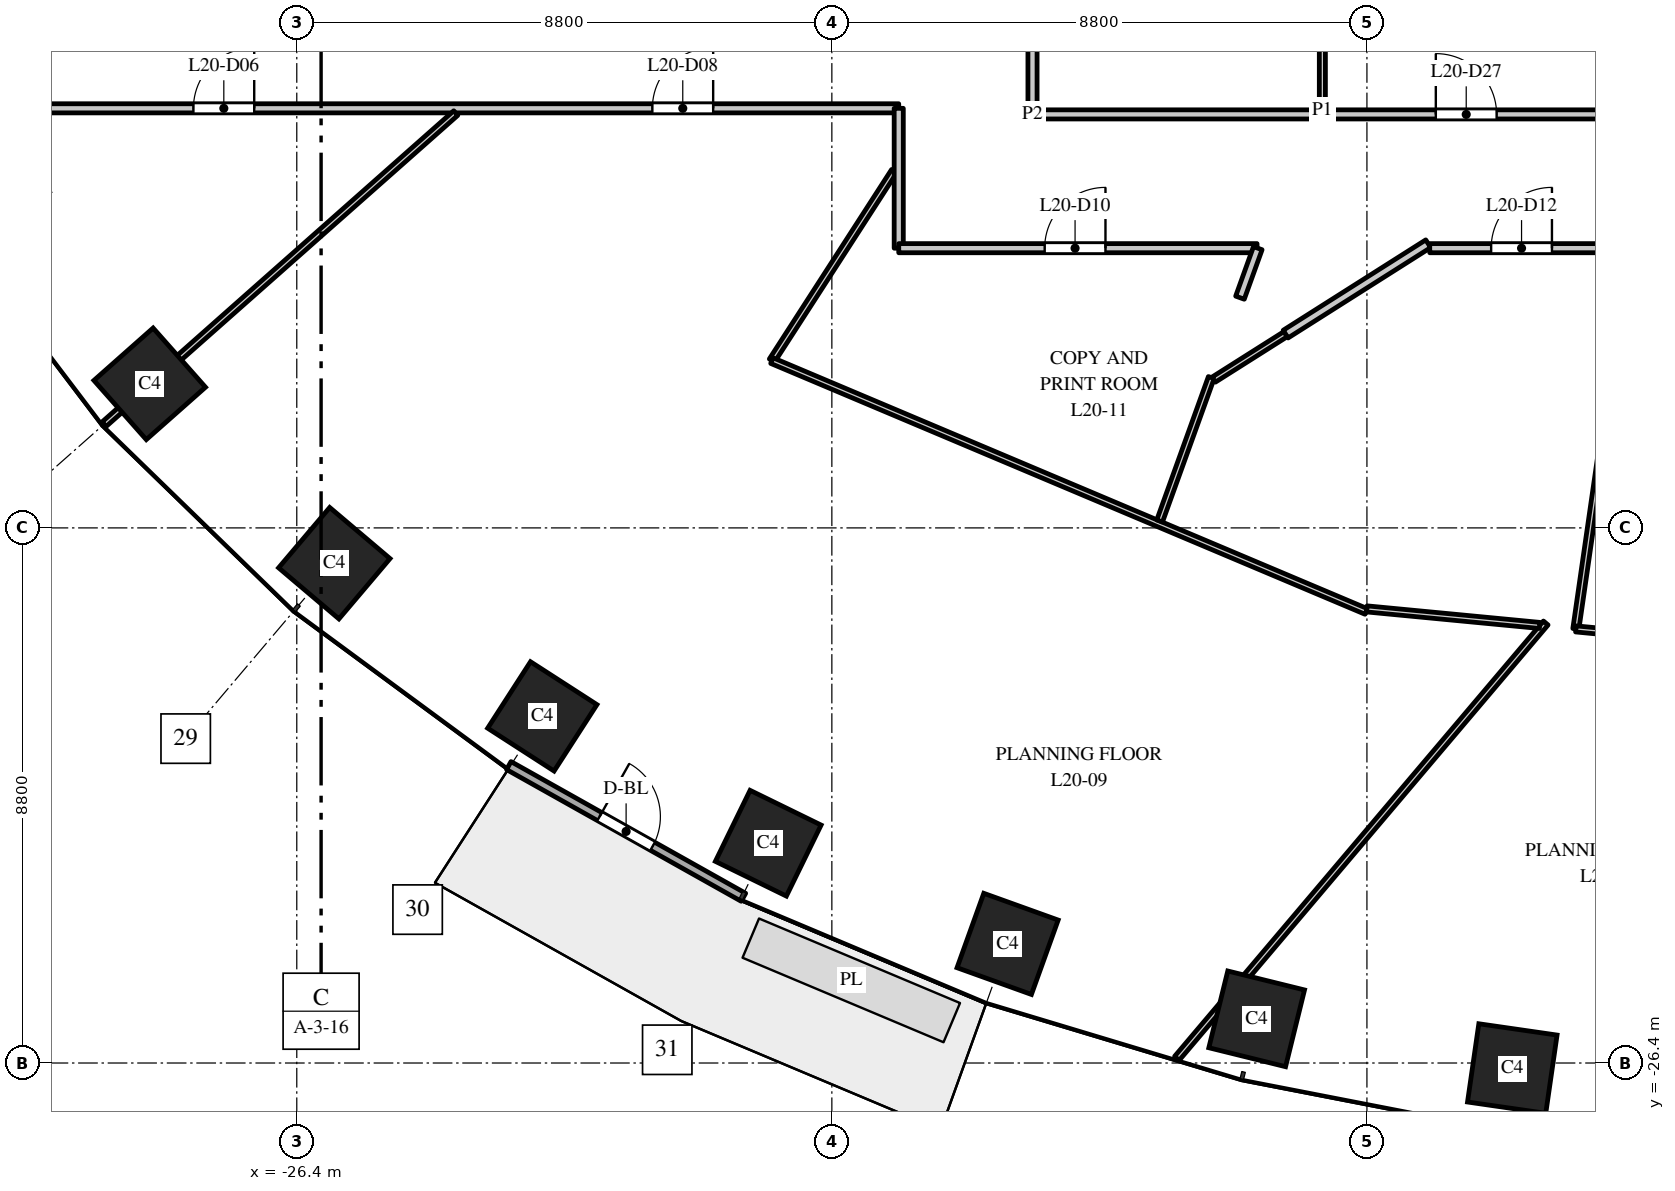
"""IFC4 building model, lengths in metres.
Left out: names, types, materials, properties, quantities, classifications, styles, units other than length and angle.
Written with IfcOpenShell. Run it as: python <this file> out.ifc"""

import sys

from ifc_helpers import new_model, si_unit, direction, frame, frame_2d, origin, origin_2d, place, context, subcontext, project, spatial, rectangle, extrude, element, fill, save


model = new_model("IFC4")
c1 = context("Model", 3, precision=1e-05, world=origin(), true_north=direction((0.0, 1.0)))
c2 = subcontext(c1, "Body", "Model", "MODEL_VIEW")
j1 = project(units=[si_unit("LENGTHUNIT", "METRE"), si_unit("PLANEANGLEUNIT", "RADIAN")], contexts=[c1])
p1 = place(None, origin())
s1 = spatial("IfcSite", under=j1, at=p1, CompositionType="ELEMENT")
p2 = place(p1, origin())
s2 = spatial("IfcBuilding", under=s1, at=p2, CompositionType="ELEMENT")
p3 = place(p2, frame((0.0, 0.0, 92.0)))
s3 = spatial("IfcBuildingStorey", under=s2, at=p3, CompositionType="ELEMENT", Elevation=92.0)
for number, where, z_axis, x_axis in (
    (1, (-28.819, -15.23, 0.0), (0.0, 0.0, 1.0), (0.663, -0.749, 0.0)),
    (2, (-25.783, -18.18, 0.0), (0.0, 0.0, 1.0), (0.763, -0.646, 0.0)),
    (3, (-22.362, -20.7, 0.0), (0.0, 0.0, 1.0), (0.84, -0.542, 0.0)),
    (4, (-18.646, -22.785, 0.0), (0.0, 0.0, 1.0), (0.898, -0.439, 0.0)),
    (5, (-14.709, -24.441, 0.0), (0.0, 0.0, 1.0), (0.941, -0.338, 0.0)),
    (6, (-10.613, -25.674, 0.0), (0.0, 0.0, 1.0), (0.971, -0.24, 0.0)),
    (7, (-6.409, -26.491, 0.0), (0.0, 0.0, 1.0), (0.99, -0.143, 0.0)),
):
    element("IfcColumn", number, at=place(p3, frame(where, z_axis=z_axis, x_axis=x_axis)), inside=s3, PredefinedType="COLUMN", context=c2, shape_type="SweptSolid", body=[
        extrude(rectangle(XDim=1.3, YDim=1.3, at=origin_2d()), origin(), (0.0, 0.0, 1.0), 4.0),
    ])
p4 = place(p3, frame((-22.913, -21.509, 0.0), z_axis=(0.0, 0.0, 1.0), x_axis=(0.872046572975, -0.489422899509, 0.0)))
e8 = element("IfcWall", 8, at=p4, inside=s3, PredefinedType="STANDARD", context=c2, shape_type="SweptSolid", body=[
    extrude(rectangle(XDim=4.426, YDim=0.15, at=frame_2d((2.213, 0.0))), origin(), (0.0, 0.0, 1.0), 3.7),
])
p5 = place(p4, frame((1.713, 0.0, 0.0)))
e9 = element("IfcOpeningElement", 9, at=p5, cuts=e8, PredefinedType="OPENING", context=c2, shape_type="SweptSolid", body=[
    extrude(rectangle(XDim=1.0, YDim=2.4, at=frame_2d((0.5, 1.2))), frame((0.0, 0.085, 0.0), z_axis=(0.0, -1.0, 0.0), x_axis=(1.0, 0.0, 0.0)), (0.0, 0.0, 1.0), 0.17),
])
p6 = place(p3, frame((-31.5, -10.7, 0.0), z_axis=(0.0, 0.0, 1.0), x_axis=(1.0, 0.0, 0.0)))
e10 = element("IfcWall", 10, at=p6, inside=s3, PredefinedType="PARTITIONING", context=c2, shape_type="SweptSolid", body=[
    extrude(rectangle(XDim=15.0, YDim=0.15, at=frame_2d((7.5, 0.0))), origin(), (0.0, 0.0, 1.0), 3.1),
])
p7 = place(p6, frame((3.4, 0.0, 0.0)))
e11 = element("IfcOpeningElement", 11, at=p7, cuts=e10, PredefinedType="OPENING", context=c2, shape_type="SweptSolid", body=[
    extrude(rectangle(XDim=1.0, YDim=2.1, at=frame_2d((0.5, 1.05))), frame((0.0, 0.085, 0.0), z_axis=(0.0, -1.0, 0.0), x_axis=(1.0, 0.0, 0.0)), (0.0, 0.0, 1.0), 0.17),
])
p8 = place(p6, frame((10.948, 0.0, 0.0)))
e12 = element("IfcOpeningElement", 12, at=p8, cuts=e10, PredefinedType="OPENING", context=c2, shape_type="SweptSolid", body=[
    extrude(rectangle(XDim=1.0, YDim=2.1, at=frame_2d((0.5, 1.05))), frame((0.0, 0.085, 0.0), z_axis=(0.0, -1.0, 0.0), x_axis=(1.0, 0.0, 0.0)), (0.0, 0.0, 1.0), 0.17),
])
p9 = place(p3, frame((-29.569, -15.895, 0.0), z_axis=(0.0, 0.0, 1.0), x_axis=(0.748985701008, 0.662586160198, 0.0)))
e13 = element("IfcWall", 13, at=p9, inside=s3, PredefinedType="PARTITIONING", context=c2, shape_type="SweptSolid", body=[
    extrude(rectangle(XDim=7.723, YDim=0.1, at=frame_2d((3.861, 0.0))), origin(), (0.0, 0.0, 1.0), 2.9),
])
p10 = place(p3, frame((-18.586, -14.849, 0.0), z_axis=(0.0, 0.0, 1.0), x_axis=(0.542227325377, 0.840231829684, 0.0)))
e14 = element("IfcWall", 14, at=p10, inside=s3, PredefinedType="PARTITIONING", context=c2, shape_type="SweptSolid", body=[
    extrude(rectangle(XDim=3.709, YDim=0.1, at=frame_2d((1.854, 0.0))), origin(), (0.0, 0.0, 1.0), 2.75),
])
p11 = place(p3, frame((-18.586, -14.849, 0.0), z_axis=(0.0, 0.0, 1.0), x_axis=(0.921309292198, -0.388830539066, 0.0)))
e15 = element("IfcWall", 15, at=p11, inside=s3, PredefinedType="PARTITIONING", context=c2, shape_type="SweptSolid", body=[
    extrude(rectangle(XDim=10.609, YDim=0.1, at=frame_2d((5.304, 0.0))), origin(), (0.0, 0.0, 1.0), 2.85),
])
p12 = place(p3, frame((-16.5, -13.0, 0.0), z_axis=(0.0, 0.0, 1.0), x_axis=(0.0, 1.0, 0.0)))
e16 = element("IfcWall", 16, at=p12, inside=s3, PredefinedType="PARTITIONING", context=c2, shape_type="SweptSolid", body=[
    extrude(rectangle(XDim=2.3, YDim=0.15, at=frame_2d((1.15, 0.0))), origin(), (0.0, 0.0, 1.0), 2.75),
])
p13 = place(p3, frame((-16.5, -13.0, 0.0), z_axis=(0.0, 0.0, 1.0), x_axis=(1.0, 0.0, 0.0)))
e17 = element("IfcWall", 17, at=p13, inside=s3, PredefinedType="PARTITIONING", context=c2, shape_type="SweptSolid", body=[
    extrude(rectangle(XDim=5.893, YDim=0.15, at=frame_2d((2.947, 0.0))), origin(), (0.0, 0.0, 1.0), 2.85),
])
p14 = place(p13, frame((2.4, 0.0, 0.0)))
e18 = element("IfcOpeningElement", 18, at=p14, cuts=e17, PredefinedType="OPENING", context=c2, shape_type="SweptSolid", body=[
    extrude(rectangle(XDim=1.0, YDim=2.1, at=frame_2d((0.5, 1.05))), frame((0.0, 0.085, 0.0), z_axis=(0.0, -1.0, 0.0), x_axis=(1.0, 0.0, 0.0)), (0.0, 0.0, 1.0), 0.17),
])
p15 = place(p3, frame((-14.3, -10.8, 0.0), z_axis=(0.0, 0.0, 1.0), x_axis=(0.0, 1.0, 0.0)))
e19 = element("IfcWall", 19, at=p15, inside=s3, PredefinedType="PARTITIONING", context=c2, shape_type="SweptSolid", body=[
    extrude(rectangle(XDim=21.6, YDim=0.15, at=frame_2d((10.8, 0.0))), origin(), (0.0, 0.0, 1.0), 2.75),
])
p16 = place(p15, frame((10.4, 0.0, 0.0)))
e20 = element("IfcOpeningElement", 20, at=p16, cuts=e19, PredefinedType="OPENING", context=c2, shape_type="SweptSolid", body=[
    extrude(rectangle(XDim=1.0, YDim=2.1, at=frame_2d((0.5, 1.05))), frame((0.0, 0.085, 0.0), z_axis=(0.0, -1.0, 0.0), x_axis=(1.0, 0.0, 0.0)), (0.0, 0.0, 1.0), 0.17),
])
p17 = place(p3, frame((-14.3, -10.8, 0.0), z_axis=(0.0, 0.0, 1.0), x_axis=(1.0, 0.0, 0.0)))
e21 = element("IfcWall", 21, at=p17, inside=s3, PredefinedType="PARTITIONING", context=c2, shape_type="SweptSolid", body=[
    extrude(rectangle(XDim=28.6, YDim=0.15, at=frame_2d((14.3, 0.0))), origin(), (0.0, 0.0, 1.0), 2.85),
])
p18 = place(p17, frame((6.633, 0.0, 0.0)))
e22 = element("IfcOpeningElement", 22, at=p18, cuts=e21, PredefinedType="OPENING", context=c2, shape_type="SweptSolid", body=[
    extrude(rectangle(XDim=1.0, YDim=2.1, at=frame_2d((0.5, 1.05))), frame((0.0, 0.085, 0.0), z_axis=(0.0, -1.0, 0.0), x_axis=(1.0, 0.0, 0.0)), (0.0, 0.0, 1.0), 0.17),
])
p19 = place(p17, frame((11.4, 0.0, 0.0)))
e23 = element("IfcOpeningElement", 23, at=p19, cuts=e21, PredefinedType="OPENING", context=c2, shape_type="SweptSolid", body=[
    extrude(rectangle(XDim=1.0, YDim=2.1, at=frame_2d((0.5, 1.05))), frame((0.0, 0.085, 0.0), z_axis=(0.0, -1.0, 0.0), x_axis=(1.0, 0.0, 0.0)), (0.0, 0.0, 1.0), 0.17),
])
p20 = place(p17, frame((16.167, 0.0, 0.0)))
e24 = element("IfcOpeningElement", 24, at=p20, cuts=e21, PredefinedType="OPENING", context=c2, shape_type="SweptSolid", body=[
    extrude(rectangle(XDim=1.0, YDim=2.1, at=frame_2d((0.5, 1.05))), frame((0.0, 0.085, 0.0), z_axis=(0.0, -1.0, 0.0), x_axis=(1.0, 0.0, 0.0)), (0.0, 0.0, 1.0), 0.17),
])
p21 = place(p3, frame((-12.209, -17.486, 0.0), z_axis=(0.0, 0.0, 1.0), x_axis=(0.338698771758, 0.940894862357, 0.0)))
e25 = element("IfcWall", 25, at=p21, inside=s3, PredefinedType="PARTITIONING", context=c2, shape_type="SweptSolid", body=[
    extrude(rectangle(XDim=2.506, YDim=0.1, at=frame_2d((1.253, 0.0))), origin(), (0.0, 0.0, 1.0), 3.7),
])
p22 = place(p3, frame((-11.925, -26.323, 0.0), z_axis=(0.0, 0.0, 1.0), x_axis=(0.646476265577, 0.762934098101, 0.0)))
e26 = element("IfcWall", 26, at=p22, inside=s3, PredefinedType="PARTITIONING", context=c2, shape_type="SweptSolid", body=[
    extrude(rectangle(XDim=9.384, YDim=0.1, at=frame_2d((4.692, 0.0))), origin(), (0.0, 0.0, 1.0), 2.85),
])
p23 = place(p3, frame((-11.319, -15.161, 0.0), z_axis=(0.0, 0.0, 1.0), x_axis=(0.845102975348, 0.534603555037, 0.0)))
e27 = element("IfcWall", 27, at=p23, inside=s3, PredefinedType="PARTITIONING", context=c2, shape_type="SweptSolid", body=[
    extrude(rectangle(XDim=1.399, YDim=0.1, at=frame_2d((0.699, 0.0))), origin(), (0.0, 0.0, 1.0), 3.7),
])
p24 = place(p3, frame((-10.888, -13.814, 0.0), z_axis=(0.0, 0.0, 1.0), x_axis=(0.338659506624, 0.940908995904, 0.0)))
e28 = element("IfcWall", 28, at=p24, inside=s3, PredefinedType="PARTITIONING", context=c2, shape_type="SweptSolid", body=[
    extrude(rectangle(XDim=0.865, YDim=0.15, at=frame_2d((0.433, 0.0))), origin(), (0.0, 0.0, 1.0), 2.85),
])
p25 = place(p3, frame((-10.137, -14.413, 0.0), z_axis=(0.0, 0.0, 1.0), x_axis=(0.844666662568, 0.535292657475, 0.0)))
e29 = element("IfcWall", 29, at=p25, inside=s3, PredefinedType="PARTITIONING", context=c2, shape_type="SweptSolid", body=[
    extrude(rectangle(XDim=2.776, YDim=0.15, at=frame_2d((1.388, 0.0))), origin(), (0.0, 0.0, 1.0), 3.7),
])
p26 = place(p3, frame((-9.533, -10.725, 0.0), z_axis=(0.0, 0.0, 1.0), x_axis=(0.0, 1.0, 0.0)))
e30 = element("IfcWall", 30, at=p26, inside=s3, PredefinedType="PARTITIONING", context=c2, shape_type="SweptSolid", body=[
    extrude(rectangle(XDim=21.45, YDim=0.1, at=frame_2d((10.725, 0.0))), origin(), (0.0, 0.0, 1.0), 2.75),
])
p27 = place(p3, frame((-8.802, -18.932, 0.0), z_axis=(0.0, 0.0, 1.0), x_axis=(0.995447320833, -0.095313332995, 0.0)))
e31 = element("IfcWall", 31, at=p27, inside=s3, PredefinedType="PARTITIONING", context=c2, shape_type="SweptSolid", body=[
    extrude(rectangle(XDim=2.856, YDim=0.1, at=frame_2d((1.428, 0.0))), origin(), (0.0, 0.0, 1.0), 2.85),
])
p28 = place(p3, frame((-7.767, -13.0, 0.0), z_axis=(0.0, 0.0, 1.0), x_axis=(1.0, 0.0, 0.0)))
e32 = element("IfcWall", 32, at=p28, inside=s3, PredefinedType="PARTITIONING", context=c2, shape_type="SweptSolid", body=[
    extrude(rectangle(XDim=3.288, YDim=0.15, at=frame_2d((1.644, 0.0))), origin(), (0.0, 0.0, 1.0), 2.85),
])
p29 = place(p28, frame((1.01, 0.0, 0.0)))
e33 = element("IfcOpeningElement", 33, at=p29, cuts=e32, PredefinedType="OPENING", context=c2, shape_type="SweptSolid", body=[
    extrude(rectangle(XDim=1.0, YDim=2.1, at=frame_2d((0.5, 1.05))), frame((0.0, 0.085, 0.0), z_axis=(0.0, -1.0, 0.0), x_axis=(1.0, 0.0, 0.0)), (0.0, 0.0, 1.0), 0.17),
])
p30 = place(p3, frame((-5.364, -19.261, 0.0), z_axis=(0.0, 0.0, 1.0), x_axis=(0.142999851524, 0.989722709886, 0.0)))
e34 = element("IfcWall", 34, at=p30, inside=s3, PredefinedType="PARTITIONING", context=c2, shape_type="SweptSolid", body=[
    extrude(rectangle(XDim=6.322, YDim=0.1, at=frame_2d((3.161, 0.0))), origin(), (0.0, 0.0, 1.0), 3.7),
])
p31 = place(p3, frame((-5.364, -19.261, 0.0), z_axis=(0.0, 0.0, 1.0), x_axis=(0.995450891917, -0.095276029415, 0.0)))
e35 = element("IfcWall", 35, at=p31, inside=s3, PredefinedType="PARTITIONING", context=c2, shape_type="SweptSolid", body=[
    extrude(rectangle(XDim=4.787, YDim=0.1, at=frame_2d((2.393, 0.0))), origin(), (0.0, 0.0, 1.0), 2.85),
])
p32 = place(p5, origin())
e36 = element("IfcDoor", 36, at=p32, inside=s3, OperationType="SINGLE_SWING_LEFT", PredefinedType="DOOR", context=c2, shape_type="SweptSolid", body=[
    extrude(rectangle(XDim=1.0, YDim=2.4, at=frame_2d((0.5, 1.2))), frame((0.0, 0.025, 0.0), z_axis=(0.0, -1.0, 0.0), x_axis=(1.0, 0.0, 0.0)), (0.0, 0.0, 1.0), 0.05),
])
fill(e9, e36)
p33 = place(p7, origin())
e37 = element("IfcDoor", 37, at=p33, inside=s3, OperationType="SINGLE_SWING_RIGHT", PredefinedType="DOOR", context=c2, shape_type="SweptSolid", body=[
    extrude(rectangle(XDim=1.0, YDim=2.1, at=frame_2d((0.5, 1.05))), frame((0.0, 0.025, 0.0), z_axis=(0.0, -1.0, 0.0), x_axis=(1.0, 0.0, 0.0)), (0.0, 0.0, 1.0), 0.05),
])
fill(e11, e37)
p34 = place(p8, origin())
e38 = element("IfcDoor", 38, at=p34, inside=s3, OperationType="SINGLE_SWING_RIGHT", PredefinedType="DOOR", context=c2, shape_type="SweptSolid", body=[
    extrude(rectangle(XDim=1.0, YDim=2.1, at=frame_2d((0.5, 1.05))), frame((0.0, 0.025, 0.0), z_axis=(0.0, -1.0, 0.0), x_axis=(1.0, 0.0, 0.0)), (0.0, 0.0, 1.0), 0.05),
])
fill(e12, e38)
p35 = place(p14, origin())
e39 = element("IfcDoor", 39, at=p35, inside=s3, OperationType="SINGLE_SWING_RIGHT", PredefinedType="DOOR", context=c2, shape_type="SweptSolid", body=[
    extrude(rectangle(XDim=1.0, YDim=2.1, at=frame_2d((0.5, 1.05))), frame((0.0, 0.025, 0.0), z_axis=(0.0, -1.0, 0.0), x_axis=(1.0, 0.0, 0.0)), (0.0, 0.0, 1.0), 0.05),
])
fill(e18, e39)
p36 = place(p29, origin())
e40 = element("IfcDoor", 40, at=p36, inside=s3, OperationType="SINGLE_SWING_RIGHT", PredefinedType="DOOR", context=c2, shape_type="SweptSolid", body=[
    extrude(rectangle(XDim=1.0, YDim=2.1, at=frame_2d((0.5, 1.05))), frame((0.0, 0.025, 0.0), z_axis=(0.0, -1.0, 0.0), x_axis=(1.0, 0.0, 0.0)), (0.0, 0.0, 1.0), 0.05),
])
fill(e33, e40)
p37 = place(p18, origin())
e41 = element("IfcDoor", 41, at=p37, inside=s3, OperationType="SINGLE_SWING_LEFT", PredefinedType="DOOR", context=c2, shape_type="SweptSolid", body=[
    extrude(rectangle(XDim=1.0, YDim=2.1, at=frame_2d((0.5, 1.05))), frame((0.0, 0.025, 0.0), z_axis=(0.0, -1.0, 0.0), x_axis=(1.0, 0.0, 0.0)), (0.0, 0.0, 1.0), 0.05),
])
fill(e22, e41)
save(model, sys.argv[1])
